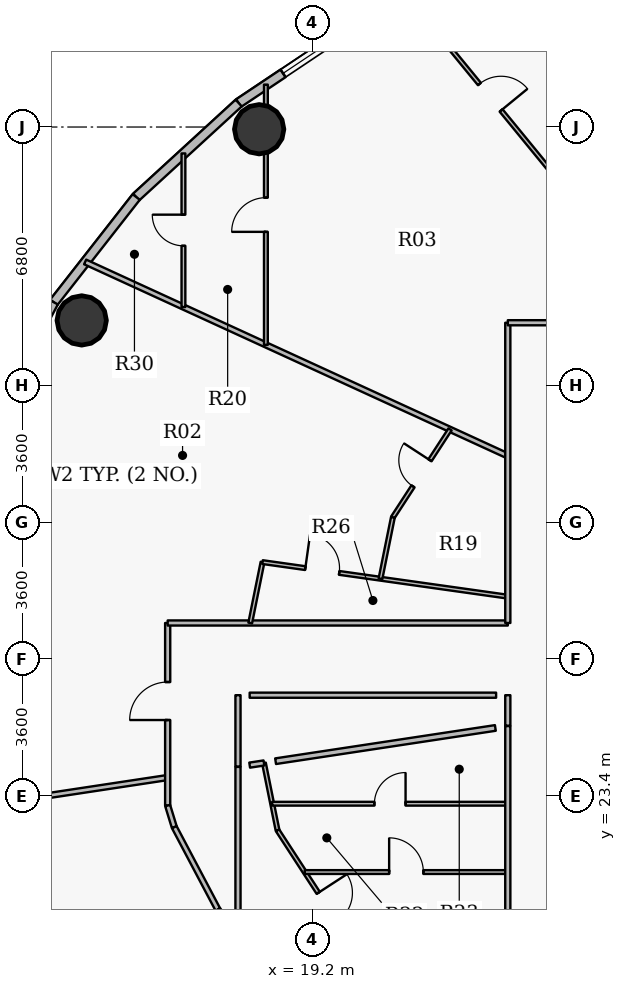
"""IFC4 building model, lengths in metres.
Left out: names, types, materials, properties, quantities, classifications, styles, units other than length and angle.
Written with IfcOpenShell. Run it as: python <this file> out.ifc"""

import sys

from ifc_helpers import new_model, si_unit, direction, frame, frame_2d, origin, origin_2d, place, context, subcontext, project, spatial, rectangle, hollow_circle, extrude, source, transform, mapped, element, fill, save


model = new_model("IFC4")
c1 = context("Model", 3, precision=1e-05, world=origin(), true_north=direction((0.0, 1.0)))
c2 = subcontext(c1, "Body", "Model", "MODEL_VIEW")
j1 = project(units=[si_unit("LENGTHUNIT", "METRE"), si_unit("PLANEANGLEUNIT", "RADIAN")], contexts=[c1])
p1 = place(None, origin())
s1 = spatial("IfcSite", under=j1, at=p1, CompositionType="ELEMENT")
p2 = place(p1, origin())
s2 = spatial("IfcBuilding", under=s1, at=p2, CompositionType="ELEMENT")
p3 = place(p2, frame((0.0, 0.0, 163.65)))
s3 = spatial("IfcBuildingStorey", under=s2, at=p3, CompositionType="ELEMENT", Elevation=163.65)
for number, where, z_axis, x_axis in (
    (1, (17.808, 40.942, 0.0), (0.0, 0.0, 1.0), (1.0, 0.0, 0.0)),
    (2, (13.137, 35.911, 0.0), (0.0, 0.0, 1.0), (1.0, 0.0, 0.0)),
):
    element("IfcColumn", number, at=place(p3, frame(where, z_axis=z_axis, x_axis=x_axis)), inside=s3, PredefinedType="COLUMN", context=c2, shape_type="SweptSolid", body=[
        extrude(hollow_circle(Radius=0.65, WallThickness=0.04, at=origin_2d()), origin(), (0.0, 0.0, 1.0), 3.75),
    ])
p4 = place(p3, frame((17.268, 41.631, 0.0), z_axis=(0.0, 0.0, 1.0), x_axis=(0.831228998277, 0.555930168657, 0.0)))
e3 = element("IfcWall", 3, at=p4, inside=s3, PredefinedType="SOLIDWALL", context=c2, shape_type="SweptSolid", body=[
    extrude(rectangle(XDim=3.8, YDim=0.24, at=frame_2d((1.9, 0.0))), origin(), (0.0, 0.0, 1.0), 3.5),
])
p5 = place(p4, frame((1.405, 0.0, 0.9)))
e4 = element("IfcOpeningElement", 4, at=p5, cuts=e3, PredefinedType="OPENING", context=c2, shape_type="SweptSolid", body=[
    extrude(rectangle(XDim=1.25, YDim=1.65, at=origin_2d()), frame((0.625, 0.13, 0.825), z_axis=(0.0, -1.0, 0.0), x_axis=(1.0, 0.0, 0.0)), (0.0, 0.0, 1.0), 0.26),
])
p6 = place(p3, frame((14.572, 39.158, 0.0), z_axis=(0.0, 0.0, 1.0), x_axis=(0.737076565834, 0.675809245349, 0.0)))
e5 = element("IfcWall", 5, at=p6, inside=s3, PredefinedType="SOLIDWALL", context=c2, shape_type="SweptSolid", body=[
    extrude(rectangle(XDim=3.658, YDim=0.24, at=frame_2d((1.829, 0.0))), origin(), (0.0, 0.0, 1.0), 3.5),
])
p7 = place(p3, frame((12.404, 36.388, 0.0), z_axis=(0.0, 0.0, 1.0), x_axis=(0.616287674549, 0.787521112224, 0.0)))
e6 = element("IfcWall", 6, at=p7, inside=s3, PredefinedType="SOLIDWALL", context=c2, shape_type="SweptSolid", body=[
    extrude(rectangle(XDim=3.517, YDim=0.24, at=frame_2d((1.759, 0.0))), origin(), (0.0, 0.0, 1.0), 3.5),
])
p8 = place(p3, frame((10.817, 33.389, 0.0), z_axis=(0.0, 0.0, 1.0), x_axis=(0.467586874938, 0.88394712194, 0.0)))
e7 = element("IfcWall", 7, at=p8, inside=s3, PredefinedType="SOLIDWALL", context=c2, shape_type="SweptSolid", body=[
    extrude(rectangle(XDim=3.393, YDim=0.24, at=frame_2d((1.697, 0.0))), origin(), (0.0, 0.0, 1.0), 3.5),
])
p9 = place(p8, frame((1.172, 0.0, 0.0)))
e8 = element("IfcOpeningElement", 8, at=p9, cuts=e7, PredefinedType="OPENING", context=c2, shape_type="SweptSolid", body=[
    extrude(rectangle(XDim=1.05, YDim=2.15, at=origin_2d()), frame((0.525, 0.13, 1.075), z_axis=(0.0, -1.0, 0.0), x_axis=(1.0, 0.0, 0.0)), (0.0, 0.0, 1.0), 0.26),
])
p10 = place(p3, frame((12.404, 17.612, 0.0), z_axis=(0.0, 0.0, 1.0), x_axis=(-0.467586874938, 0.88394712194, 0.0)))
e9 = element("IfcWall", 9, at=p10, inside=s3, PredefinedType="SOLIDWALL", context=c2, shape_type="SweptSolid", body=[
    extrude(rectangle(XDim=3.393, YDim=0.24, at=frame_2d((1.697, 0.0))), origin(), (0.0, 0.0, 1.0), 3.5),
])
p11 = place(p10, frame((1.072, 0.0, 0.9)))
e10 = element("IfcOpeningElement", 10, at=p11, cuts=e9, PredefinedType="OPENING", context=c2, shape_type="SweptSolid", body=[
    extrude(rectangle(XDim=1.25, YDim=1.65, at=origin_2d()), frame((0.625, 0.13, 0.825), z_axis=(0.0, -1.0, 0.0), x_axis=(1.0, 0.0, 0.0)), (0.0, 0.0, 1.0), 0.26),
])
p12 = place(p3, frame((10.057, 23.075, 0.0), z_axis=(0.0, 0.0, 1.0), x_axis=(0.988756022356, 0.14953771516, 0.0)))
e11 = element("IfcWall", 11, at=p12, inside=s3, PredefinedType="PARTITIONING", context=c2, shape_type="SweptSolid", body=[
    extrude(rectangle(XDim=5.404, YDim=0.135, at=frame_2d((2.702, 0.0))), origin(), (0.0, 0.0, 1.0), 2.935),
])
p13 = place(p3, frame((13.229, 37.45, 0.0), z_axis=(0.0, 0.0, 1.0), x_axis=(0.908867611309, -0.417084721746, 0.0)))
e12 = element("IfcWall", 12, at=p13, inside=s3, PredefinedType="PARTITIONING", context=c2, shape_type="SweptSolid", body=[
    extrude(rectangle(XDim=12.237, YDim=0.135, at=frame_2d((6.118, 0.0))), origin(), (0.0, 0.0, 1.0), 2.935),
])
p14 = place(p3, frame((15.4, 23.146, 0.0), z_axis=(0.0, 0.0, 1.0), x_axis=(0.0, 1.0, 0.0)))
e13 = element("IfcWall", 13, at=p14, inside=s3, PredefinedType="PARTITIONING", context=c2, shape_type="SweptSolid", body=[
    extrude(rectangle(XDim=4.804, YDim=0.135, at=frame_2d((2.402, 0.0))), origin(), (0.0, 0.0, 1.0), 2.935),
])
p15 = place(p14, frame((2.251, 0.0, 0.0)))
e14 = element("IfcOpeningElement", 14, at=p15, cuts=e13, PredefinedType="OPENING", context=c2, shape_type="SweptSolid", body=[
    extrude(rectangle(XDim=1.0, YDim=2.15, at=origin_2d()), frame((0.5, 0.078, 1.075), z_axis=(0.0, -1.0, 0.0), x_axis=(1.0, 0.0, 0.0)), (0.0, 0.0, 1.0), 0.155),
])
p16 = place(p3, frame((15.4, 23.146, 0.0), z_axis=(0.0, 0.0, 1.0), x_axis=(0.293335154151, -0.956009669061, 0.0)))
e15 = element("IfcWall", 15, at=p16, inside=s3, PredefinedType="PARTITIONING", context=c2, shape_type="SweptSolid", body=[
    extrude(rectangle(XDim=0.594, YDim=0.135, at=frame_2d((0.297, 0.0))), origin(), (0.0, 0.0, 1.0), 3.5),
])
p17 = place(p3, frame((15.4, 27.95, 0.0), z_axis=(0.0, 0.0, 1.0), x_axis=(1.0, 0.0, 0.0)))
e16 = element("IfcWall", 16, at=p17, inside=s3, PredefinedType="PARTITIONING", context=c2, shape_type="SweptSolid", body=[
    extrude(rectangle(XDim=8.95, YDim=0.135, at=frame_2d((4.475, 0.0))), origin(), (0.0, 0.0, 1.0), 3.5),
])
p18 = place(p3, frame((15.574, 22.578, 0.0), z_axis=(0.0, 0.0, 1.0), x_axis=(0.46757196543, -0.883955008552, 0.0)))
e17 = element("IfcWall", 17, at=p18, inside=s3, PredefinedType="PARTITIONING", context=c2, shape_type="SweptSolid", body=[
    extrude(rectangle(XDim=2.451, YDim=0.135, at=frame_2d((1.226, 0.0))), origin(), (0.0, 0.0, 1.0), 2.935),
])
p19 = place(p3, frame((15.815, 36.263, 0.0), z_axis=(0.0, 0.0, 1.0), x_axis=(0.0, 1.0, 0.0)))
e18 = element("IfcWall", 18, at=p19, inside=s3, PredefinedType="PARTITIONING", context=c2, shape_type="SweptSolid", body=[
    extrude(rectangle(XDim=4.042, YDim=0.1, at=frame_2d((2.021, 0.0))), origin(), (0.0, 0.0, 1.0), 2.935),
])
p20 = place(p19, frame((1.611, 0.0, 0.0)))
e19 = element("IfcOpeningElement", 19, at=p20, cuts=e18, PredefinedType="OPENING", context=c2, shape_type="SweptSolid", body=[
    extrude(rectangle(XDim=0.82, YDim=2.1, at=origin_2d()), frame((0.41, 0.06, 1.05), z_axis=(0.0, -1.0, 0.0), x_axis=(1.0, 0.0, 0.0)), (0.0, 0.0, 1.0), 0.12),
])
p21 = place(p3, frame((16.72, 20.411, 0.0), z_axis=(0.0, 0.0, 1.0), x_axis=(0.616377221056, -0.787451027914, 0.0)))
e20 = element("IfcWall", 20, at=p21, inside=s3, PredefinedType="PARTITIONING", context=c2, shape_type="SweptSolid", body=[
    extrude(rectangle(XDim=0.859, YDim=0.135, at=frame_2d((0.43, 0.0))), origin(), (0.0, 0.0, 1.0), 3.5),
])
p22 = place(p3, frame((17.25, 19.734, 0.0), z_axis=(0.0, 0.0, 1.0), x_axis=(0.0, 1.0, 0.0)))
e21 = element("IfcWall", 21, at=p22, inside=s3, PredefinedType="PARTITIONING", context=c2, shape_type="SweptSolid", body=[
    extrude(rectangle(XDim=4.429, YDim=0.135, at=frame_2d((2.215, 0.0))), origin(), (0.0, 0.0, 1.0), 2.935),
])
p23 = place(p3, frame((17.572, 27.95, 0.0), z_axis=(0.0, 0.0, 1.0), x_axis=(0.19821259699, 0.98015905158, 0.0)))
e22 = element("IfcWall", 22, at=p23, inside=s3, PredefinedType="PARTITIONING", context=c2, shape_type="SweptSolid", body=[
    extrude(rectangle(XDim=1.635, YDim=0.1, at=frame_2d((0.817, 0.0))), origin(), (0.0, 0.0, 1.0), 3.5),
])
p24 = place(p3, frame((17.896, 29.552, 0.0), z_axis=(0.0, 0.0, 1.0), x_axis=(0.990212218954, -0.139569915938, 0.0)))
e23 = element("IfcWall", 23, at=p24, inside=s3, PredefinedType="PARTITIONING", context=c2, shape_type="SweptSolid", body=[
    extrude(rectangle(XDim=6.518, YDim=0.1, at=frame_2d((3.259, 0.0))), origin(), (0.0, 0.0, 1.0), 3.5),
])
p25 = place(p24, frame((1.137, 0.0, 0.0)))
e24 = element("IfcOpeningElement", 24, at=p25, cuts=e23, PredefinedType="OPENING", context=c2, shape_type="SweptSolid", body=[
    extrude(rectangle(XDim=0.9, YDim=2.1, at=origin_2d()), frame((0.45, 0.06, 1.05), z_axis=(0.0, -1.0, 0.0), x_axis=(1.0, 0.0, 0.0)), (0.0, 0.0, 1.0), 0.12),
])
p26 = place(p3, frame((17.933, 24.267, 0.0), z_axis=(0.0, 0.0, 1.0), x_axis=(0.198166528342, -0.980168366682, 0.0)))
e25 = element("IfcWall", 25, at=p26, inside=s3, PredefinedType="PARTITIONING", context=c2, shape_type="SweptSolid", body=[
    extrude(rectangle(XDim=1.809, YDim=0.1, at=frame_2d((0.904, 0.0))), origin(), (0.0, 0.0, 1.0), 2.935),
])
p27 = place(p3, frame((17.984, 35.267, 0.0), z_axis=(0.0, 0.0, 1.0), x_axis=(0.0, 1.0, 0.0)))
e26 = element("IfcWall", 26, at=p27, inside=s3, PredefinedType="PARTITIONING", context=c2, shape_type="SweptSolid", body=[
    extrude(rectangle(XDim=6.848, YDim=0.1, at=frame_2d((3.424, 0.0))), origin(), (0.0, 0.0, 1.0), 2.935),
])
p28 = place(p27, frame((2.974, 0.0, 0.0)))
e27 = element("IfcOpeningElement", 27, at=p28, cuts=e26, PredefinedType="OPENING", context=c2, shape_type="SweptSolid", body=[
    extrude(rectangle(XDim=0.9, YDim=2.1, at=origin_2d()), frame((0.45, 0.06, 1.05), z_axis=(0.0, -1.0, 0.0), x_axis=(1.0, 0.0, 0.0)), (0.0, 0.0, 1.0), 0.12),
])
p29 = place(p3, frame((18.15, 23.195, 0.0), z_axis=(0.0, 0.0, 1.0), x_axis=(1.0, 0.0, 0.0)))
e28 = element("IfcWall", 28, at=p29, inside=s3, PredefinedType="PARTITIONING", context=c2, shape_type="SweptSolid", body=[
    extrude(rectangle(XDim=6.2, YDim=0.1, at=frame_2d((3.1, 0.0))), origin(), (0.0, 0.0, 1.0), 2.935),
])
p30 = place(p29, frame((2.69, 0.0, 0.0)))
e29 = element("IfcOpeningElement", 29, at=p30, cuts=e28, PredefinedType="OPENING", context=c2, shape_type="SweptSolid", body=[
    extrude(rectangle(XDim=0.82, YDim=2.1, at=origin_2d()), frame((0.41, 0.06, 1.05), z_axis=(0.0, -1.0, 0.0), x_axis=(1.0, 0.0, 0.0)), (0.0, 0.0, 1.0), 0.12),
])
p31 = place(p3, frame((18.291, 22.494, 0.0), z_axis=(0.0, 0.0, 1.0), x_axis=(0.545405921784, -0.838172047066, 0.0)))
e30 = element("IfcWall", 30, at=p31, inside=s3, PredefinedType="PARTITIONING", context=c2, shape_type="SweptSolid", body=[
    extrude(rectangle(XDim=4.849, YDim=0.1, at=frame_2d((2.425, 0.0))), origin(), (0.0, 0.0, 1.0), 2.935),
])
p32 = place(p31, frame((1.962, 0.0, 0.0)))
e31 = element("IfcOpeningElement", 31, at=p32, cuts=e30, PredefinedType="OPENING", context=c2, shape_type="SweptSolid", body=[
    extrude(rectangle(XDim=0.9, YDim=2.1, at=origin_2d()), frame((0.45, 0.06, 1.05), z_axis=(0.0, -1.0, 0.0), x_axis=(1.0, 0.0, 0.0)), (0.0, 0.0, 1.0), 0.12),
])
p33 = place(p3, frame((19.005, 21.397, 0.0), z_axis=(0.0, 0.0, 1.0), x_axis=(1.0, 0.0, 0.0)))
e32 = element("IfcWall", 32, at=p33, inside=s3, PredefinedType="PARTITIONING", context=c2, shape_type="SweptSolid", body=[
    extrude(rectangle(XDim=5.345, YDim=0.1, at=frame_2d((2.672, 0.0))), origin(), (0.0, 0.0, 1.0), 3.5),
])
p34 = place(p33, frame((2.222, 0.0, 0.0)))
e33 = element("IfcOpeningElement", 33, at=p34, cuts=e32, PredefinedType="OPENING", context=c2, shape_type="SweptSolid", body=[
    extrude(rectangle(XDim=0.9, YDim=2.1, at=origin_2d()), frame((0.45, 0.06, 1.05), z_axis=(0.0, -1.0, 0.0), x_axis=(1.0, 0.0, 0.0)), (0.0, 0.0, 1.0), 0.12),
])
p35 = place(p3, frame((21.0, 29.115, 0.0), z_axis=(0.0, 0.0, 1.0), x_axis=(0.198219197437, 0.980157716782, 0.0)))
e34 = element("IfcWall", 34, at=p35, inside=s3, PredefinedType="PARTITIONING", context=c2, shape_type="SweptSolid", body=[
    extrude(rectangle(XDim=1.652, YDim=0.1, at=frame_2d((0.826, 0.0))), origin(), (0.0, 0.0, 1.0), 3.5),
])
p36 = place(p3, frame((21.327, 30.733, 0.0), z_axis=(0.0, 0.0, 1.0), x_axis=(0.545365017792, 0.838198662233, 0.0)))
e35 = element("IfcWall", 35, at=p36, inside=s3, PredefinedType="PARTITIONING", context=c2, shape_type="SweptSolid", body=[
    extrude(rectangle(XDim=2.756, YDim=0.1, at=frame_2d((1.378, 0.0))), origin(), (0.0, 0.0, 1.0), 2.935),
])
p37 = place(p36, frame((0.968, 0.0, 0.0)))
e36 = element("IfcOpeningElement", 36, at=p37, cuts=e35, PredefinedType="OPENING", context=c2, shape_type="SweptSolid", body=[
    extrude(rectangle(XDim=0.82, YDim=2.1, at=origin_2d()), frame((0.41, 0.06, 1.05), z_axis=(0.0, -1.0, 0.0), x_axis=(1.0, 0.0, 0.0)), (0.0, 0.0, 1.0), 0.12),
])
p38 = place(p3, frame((21.756, 44.387, 0.0), z_axis=(0.0, 0.0, 1.0), x_axis=(0.633727642201, -0.773556252325, 0.0)))
e37 = element("IfcWall", 37, at=p38, inside=s3, PredefinedType="PARTITIONING", context=c2, shape_type="SweptSolid", body=[
    extrude(rectangle(XDim=6.729, YDim=0.1, at=frame_2d((3.365, 0.0))), origin(), (0.0, 0.0, 1.0), 2.935),
])
p39 = place(p38, frame((2.915, 0.0, 0.0)))
e38 = element("IfcOpeningElement", 38, at=p39, cuts=e37, PredefinedType="OPENING", context=c2, shape_type="SweptSolid", body=[
    extrude(rectangle(XDim=0.9, YDim=2.1, at=origin_2d()), frame((0.45, 0.06, 1.05), z_axis=(0.0, -1.0, 0.0), x_axis=(1.0, 0.0, 0.0)), (0.0, 0.0, 1.0), 0.12),
])
p40 = place(p3, frame((24.35, 18.15, 0.0), z_axis=(0.0, 0.0, 1.0), x_axis=(0.0, 1.0, 0.0)))
e39 = element("IfcWall", 39, at=p40, inside=s3, PredefinedType="PARTITIONING", context=c2, shape_type="SweptSolid", body=[
    extrude(rectangle(XDim=7.088, YDim=0.135, at=frame_2d((3.544, 0.0))), origin(), (0.0, 0.0, 1.0), 2.935),
])
p41 = place(p3, frame((24.35, 27.95, 0.0), z_axis=(0.0, 0.0, 1.0), x_axis=(0.0, 1.0, 0.0)))
e40 = element("IfcWall", 40, at=p41, inside=s3, PredefinedType="PARTITIONING", context=c2, shape_type="SweptSolid", body=[
    extrude(rectangle(XDim=7.9, YDim=0.135, at=frame_2d((3.95, 0.0))), origin(), (0.0, 0.0, 1.0), 2.935),
])
p42 = place(p3, frame((24.35, 35.85, 0.0), z_axis=(0.0, 0.0, 1.0), x_axis=(1.0, 0.0, 0.0)))
e41 = element("IfcWall", 41, at=p42, inside=s3, PredefinedType="PARTITIONING", context=c2, shape_type="SweptSolid", body=[
    extrude(rectangle(XDim=29.104, YDim=0.135, at=frame_2d((14.552, 0.0))), origin(), (0.0, 0.0, 1.0), 2.935),
])
p43 = place(p42, frame((15.972, 0.0, 0.0)))
e42 = element("IfcOpeningElement", 42, at=p43, cuts=e41, PredefinedType="OPENING", context=c2, shape_type="SweptSolid", body=[
    extrude(rectangle(XDim=1.0, YDim=2.15, at=origin_2d()), frame((0.5, 0.078, 1.075), z_axis=(0.0, -1.0, 0.0), x_axis=(1.0, 0.0, 0.0)), (0.0, 0.0, 1.0), 0.155),
])
p44 = place(p42, frame((4.074, 0.0, 0.0)))
e43 = element("IfcOpeningElement", 43, at=p44, cuts=e41, PredefinedType="OPENING", context=c2, shape_type="SweptSolid", body=[
    extrude(rectangle(XDim=1.0, YDim=2.15, at=origin_2d()), frame((0.5, 0.078, 1.075), z_axis=(0.0, -1.0, 0.0), x_axis=(1.0, 0.0, 0.0)), (0.0, 0.0, 1.0), 0.155),
])
p45 = place(p3, frame((17.25, 26.05, 0.0), z_axis=(0.0, 0.0, 1.0), x_axis=(0.0, -1.0, 0.0)))
e44 = element("IfcWall", 44, at=p45, inside=s3, PredefinedType="PARTITIONING", context=c2, shape_type="SweptSolid", body=[
    extrude(rectangle(XDim=1.876, YDim=0.135, at=frame_2d((0.938, 0.0))), origin(), (0.0, 0.0, 1.0), 3.085),
])
p46 = place(p3, frame((24.35, 25.248, 0.0), z_axis=(0.0, 0.0, 1.0), x_axis=(0.0, 1.0, 0.0)))
e45 = element("IfcWall", 45, at=p46, inside=s3, PredefinedType="PARTITIONING", context=c2, shape_type="SweptSolid", body=[
    extrude(rectangle(XDim=0.802, YDim=0.135, at=frame_2d((0.401, 0.0))), origin(), (0.0, 0.0, 1.0), 3.5),
])
p47 = place(p3, frame((24.042, 26.05, 0.0), z_axis=(0.0, 0.0, 1.0), x_axis=(-1.0, 0.0, 0.0)))
e46 = element("IfcWall", 46, at=p47, inside=s3, PredefinedType="PARTITIONING", context=c2, shape_type="SweptSolid", body=[
    extrude(rectangle(XDim=6.485, YDim=0.135, at=frame_2d((3.242, 0.0))), origin(), (0.0, 0.0, 1.0), 3.5),
])
p48 = place(p3, frame((17.558, 24.21, 0.0), z_axis=(0.0, 0.0, 1.0), x_axis=(0.988703952477, 0.149881601124, 0.0)))
e47 = element("IfcWall", 47, at=p48, inside=s3, PredefinedType="PARTITIONING", context=c2, shape_type="SweptSolid", body=[
    extrude(rectangle(XDim=0.38, YDim=0.135, at=frame_2d((0.19, 0.0))), origin(), (0.0, 0.0, 1.0), 3.085),
])
p49 = place(p3, frame((18.24, 24.313, 0.0), z_axis=(0.0, 0.0, 1.0), x_axis=(0.988751262043, 0.149569187364, 0.0)))
e48 = element("IfcWall", 48, at=p49, inside=s3, PredefinedType="PARTITIONING", context=c2, shape_type="SweptSolid", body=[
    extrude(rectangle(XDim=5.848, YDim=0.15, at=frame_2d((2.924, 0.0))), origin(), (0.0, 0.0, 1.0), 3.5),
])
m1 = source(origin(), c2, "Body", "SweptSolid", [
    extrude(rectangle(XDim=1.25, YDim=1.65, at=origin_2d()), frame((0.625, 0.03, 0.825), z_axis=(0.0, -1.0, 0.0), x_axis=(1.0, 0.0, 0.0)), (0.0, 0.0, 1.0), 0.06),
])
p50 = place(p5, origin())
e49 = element("IfcWindow", 49, at=p50, inside=s3, PartitioningType="SINGLE_PANEL", PredefinedType="WINDOW", context=c2, shape_type="MappedRepresentation", body=[
    mapped(m1, transform((0.0, 0.0, 0.0), x_axis=(1.0, 0.0, 0.0), y_axis=(0.0, 1.0, 0.0), z_axis=(0.0, 0.0, 1.0), scale=1.0)),
])
fill(e4, e49)
m2 = source(origin(), c2, "Body", "SweptSolid", [
    extrude(rectangle(XDim=0.9, YDim=2.1, at=origin_2d()), frame((0.45, 0.025, 1.05), z_axis=(0.0, -1.0, 0.0), x_axis=(1.0, 0.0, 0.0)), (0.0, 0.0, 1.0), 0.05),
])
p51 = place(p39, origin())
e50 = element("IfcDoor", 50, at=p51, inside=s3, OperationType="SINGLE_SWING_RIGHT", PredefinedType="DOOR", context=c2, shape_type="MappedRepresentation", body=[
    mapped(m2, transform((0.0, 0.0, 0.0), x_axis=(1.0, 0.0, 0.0), y_axis=(0.0, 1.0, 0.0), z_axis=(0.0, 0.0, 1.0), scale=1.0)),
])
fill(e38, e50)
p52 = place(p28, origin())
e51 = element("IfcDoor", 51, at=p52, inside=s3, OperationType="SINGLE_SWING_LEFT", PredefinedType="DOOR", context=c2, shape_type="MappedRepresentation", body=[
    mapped(m2, transform((0.0, 0.0, 0.0), x_axis=(1.0, 0.0, 0.0), y_axis=(0.0, 1.0, 0.0), z_axis=(0.0, 0.0, 1.0), scale=1.0)),
])
fill(e27, e51)
m3 = source(origin(), c2, "Body", "SweptSolid", [
    extrude(rectangle(XDim=0.82, YDim=2.1, at=origin_2d()), frame((0.41, 0.025, 1.05), z_axis=(0.0, -1.0, 0.0), x_axis=(1.0, 0.0, 0.0)), (0.0, 0.0, 1.0), 0.05),
])
p53 = place(p20, origin())
e52 = element("IfcDoor", 52, at=p53, inside=s3, OperationType="SINGLE_SWING_RIGHT", PredefinedType="DOOR", context=c2, shape_type="MappedRepresentation", body=[
    mapped(m3, transform((0.0, 0.0, 0.0), x_axis=(1.0, 0.0, 0.0), y_axis=(0.0, 1.0, 0.0), z_axis=(0.0, 0.0, 1.0), scale=1.0)),
])
fill(e19, e52)
m4 = source(origin(), c2, "Body", "SweptSolid", [
    extrude(rectangle(XDim=1.0, YDim=2.15, at=origin_2d()), frame((0.5, 0.025, 1.075), z_axis=(0.0, -1.0, 0.0), x_axis=(1.0, 0.0, 0.0)), (0.0, 0.0, 1.0), 0.05),
])
p54 = place(p15, origin())
e53 = element("IfcDoor", 53, at=p54, inside=s3, OperationType="SINGLE_SWING_LEFT", PredefinedType="DOOR", context=c2, shape_type="MappedRepresentation", body=[
    mapped(m4, transform((0.0, 0.0, 0.0), x_axis=(1.0, 0.0, 0.0), y_axis=(0.0, 1.0, 0.0), z_axis=(0.0, 0.0, 1.0), scale=1.0)),
])
fill(e14, e53)
p55 = place(p37, origin())
e54 = element("IfcDoor", 54, at=p55, inside=s3, OperationType="SINGLE_SWING_RIGHT", PredefinedType="DOOR", context=c2, shape_type="MappedRepresentation", body=[
    mapped(m3, transform((0.0, 0.0, 0.0), x_axis=(1.0, 0.0, 0.0), y_axis=(0.0, 1.0, 0.0), z_axis=(0.0, 0.0, 1.0), scale=1.0)),
])
fill(e36, e54)
p56 = place(p25, origin())
e55 = element("IfcDoor", 55, at=p56, inside=s3, OperationType="SINGLE_SWING_LEFT", PredefinedType="DOOR", context=c2, shape_type="MappedRepresentation", body=[
    mapped(m2, transform((0.0, 0.0, 0.0), x_axis=(1.0, 0.0, 0.0), y_axis=(0.0, 1.0, 0.0), z_axis=(0.0, 0.0, 1.0), scale=1.0)),
])
fill(e24, e55)
p57 = place(p32, origin())
e56 = element("IfcDoor", 56, at=p57, inside=s3, OperationType="SINGLE_SWING_LEFT", PredefinedType="DOOR", context=c2, shape_type="MappedRepresentation", body=[
    mapped(m2, transform((0.0, 0.0, 0.0), x_axis=(1.0, 0.0, 0.0), y_axis=(0.0, 1.0, 0.0), z_axis=(0.0, 0.0, 1.0), scale=1.0)),
])
fill(e31, e56)
p58 = place(p34, origin())
e57 = element("IfcDoor", 57, at=p58, inside=s3, OperationType="SINGLE_SWING_LEFT", PredefinedType="DOOR", context=c2, shape_type="MappedRepresentation", body=[
    mapped(m2, transform((0.0, 0.0, 0.0), x_axis=(1.0, 0.0, 0.0), y_axis=(0.0, 1.0, 0.0), z_axis=(0.0, 0.0, 1.0), scale=1.0)),
])
fill(e33, e57)
p59 = place(p30, origin())
e58 = element("IfcDoor", 58, at=p59, inside=s3, OperationType="SINGLE_SWING_RIGHT", PredefinedType="DOOR", context=c2, shape_type="MappedRepresentation", body=[
    mapped(m3, transform((0.0, 0.0, 0.0), x_axis=(1.0, 0.0, 0.0), y_axis=(0.0, 1.0, 0.0), z_axis=(0.0, 0.0, 1.0), scale=1.0)),
])
fill(e29, e58)
save(model, sys.argv[1])
